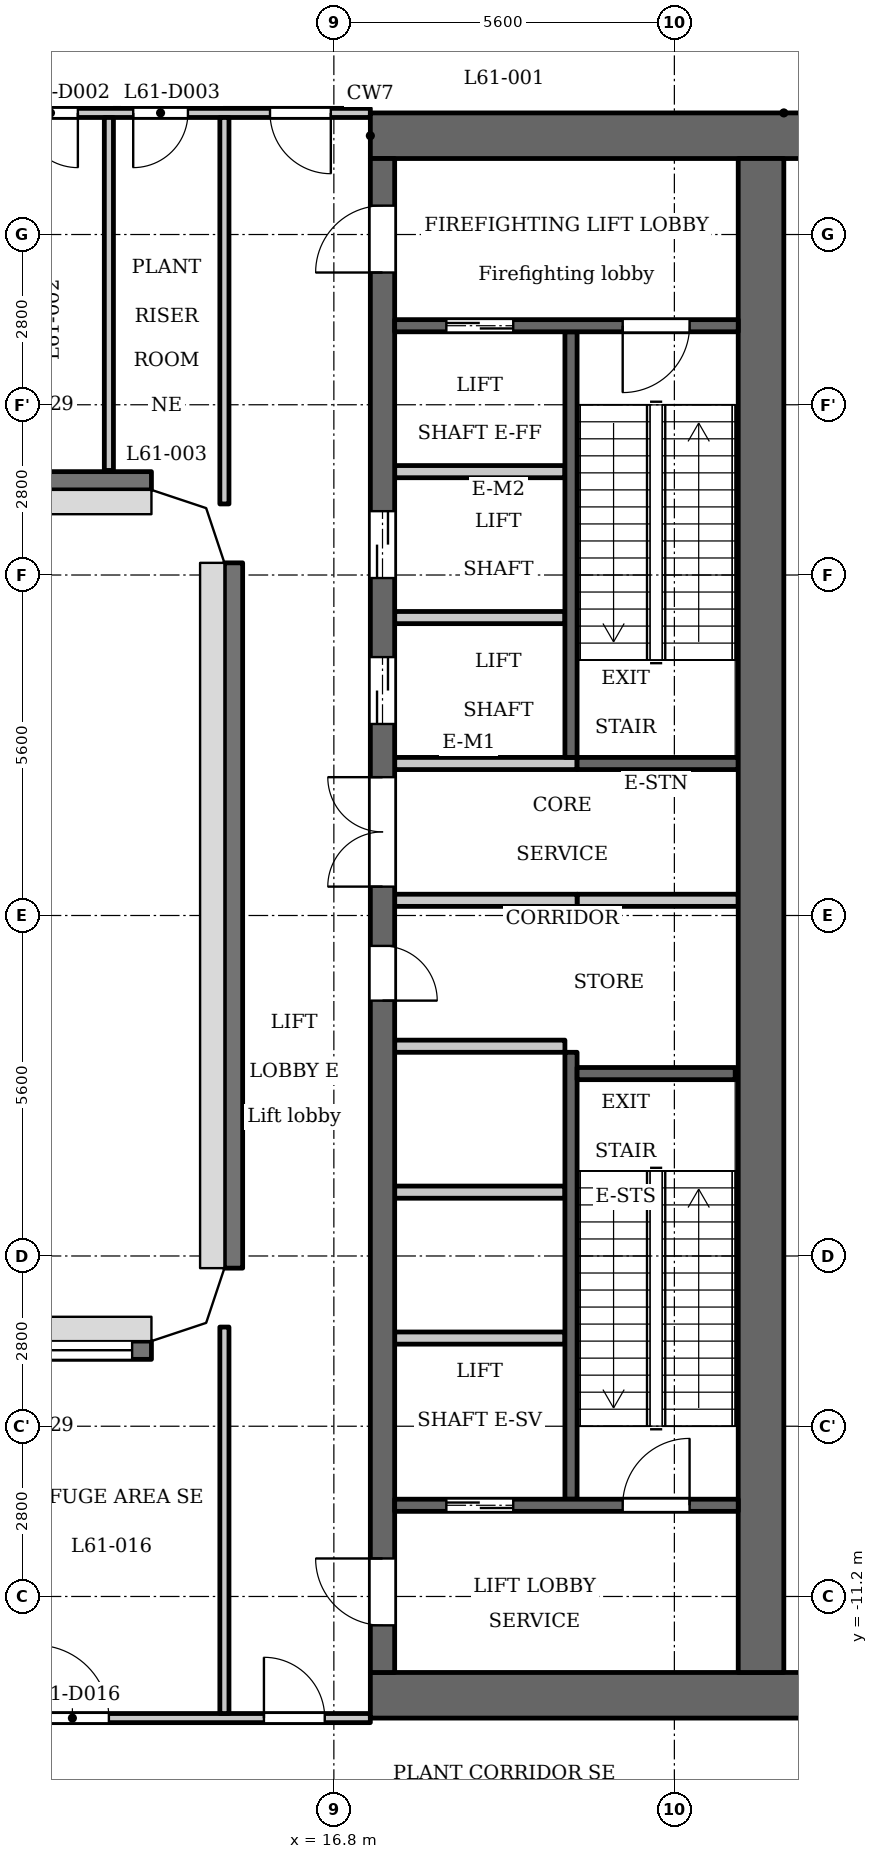
"""IFC4 building model, lengths in metres.
Left out: names, types, materials, properties, quantities, classifications, styles, units other than length and angle.
Written with IfcOpenShell. Run it as: python <this file> out.ifc"""

import sys

from ifc_helpers import new_model, si_unit, direction, frame, frame_2d, origin, place, context, subcontext, project, spatial, polyline, rectangle, outline, extrude, element, fill, save


model = new_model("IFC4")
c1 = context("Model", 3, precision=1e-05, world=origin(), true_north=direction((0.0, 1.0)))
c2 = subcontext(c1, "Body", "Model", "MODEL_VIEW")
j1 = project(units=[si_unit("LENGTHUNIT", "METRE"), si_unit("PLANEANGLEUNIT", "RADIAN")], contexts=[c1])
p1 = place(None, origin())
s1 = spatial("IfcSite", under=j1, at=p1, CompositionType="ELEMENT")
p2 = place(p1, origin())
s2 = spatial("IfcBuilding", under=s1, at=p2, CompositionType="ELEMENT")
p3 = place(p2, frame((0.0, 0.0, 236.3)))
s3 = spatial("IfcBuildingStorey", under=s2, at=p3, CompositionType="ELEMENT", Elevation=236.3)
p4 = place(p3, frame((13.8, -7.15, 0.0), z_axis=(0.0, 0.0, 1.0), x_axis=(-1.0, 0.0, 0.0)))
e1 = element("IfcWall", 1, at=p4, inside=s3, PredefinedType="SOLIDWALL", context=c2, shape_type="SweptSolid", body=[
    extrude(rectangle(XDim=2.6, YDim=0.3, at=frame_2d((1.3, 0.0))), origin(), (0.0, 0.0, 1.0), 4.6),
])
p5 = place(p4, frame((0.317, 0.0, 0.9)))
e2 = element("IfcOpeningElement", 2, at=p5, cuts=e1, PredefinedType="OPENING", context=c2, shape_type="SweptSolid", body=[
    extrude(rectangle(XDim=1.8, YDim=1.5, at=frame_2d((0.9, 0.75))), frame((0.0, 0.16, 0.0), z_axis=(0.0, -1.0, 0.0), x_axis=(1.0, 0.0, 0.0)), (0.0, 0.0, 1.0), 0.32),
])
p6 = place(p3, frame((11.2, 7.15, 0.0), z_axis=(0.0, 0.0, 1.0), x_axis=(1.0, 0.0, 0.0)))
e3 = element("IfcWall", 3, at=p6, inside=s3, PredefinedType="SOLIDWALL", context=c2, shape_type="SweptSolid", body=[
    extrude(rectangle(XDim=2.6, YDim=0.3, at=frame_2d((1.3, 0.0))), origin(), (0.0, 0.0, 1.0), 4.6),
])
p7 = place(p3, frame((15.15, 5.8, 0.0), z_axis=(0.0, 0.0, 1.0), x_axis=(0.0, -1.0, 0.0)))
e4 = element("IfcWall", 4, at=p7, inside=s3, PredefinedType="SOLIDWALL", context=c2, shape_type="SweptSolid", body=[
    extrude(rectangle(XDim=11.6, YDim=0.3, at=frame_2d((5.8, 0.0))), origin(), (0.0, 0.0, 1.0), 4.6),
])
p8 = place(p3, frame((20.7, 2.6, 0.0), z_axis=(0.0, 0.0, 1.0), x_axis=(0.0, 1.0, 0.0)))
e5 = element("IfcWall", 5, at=p8, inside=s3, PredefinedType="SHEAR", context=c2, shape_type="SweptSolid", body=[
    extrude(rectangle(XDim=7.0, YDim=0.2, at=frame_2d((3.5, 0.0))), origin(), (0.0, 0.0, 1.0), 4.6),
])
p9 = place(p3, frame((20.7, -9.6, 0.0), z_axis=(0.0, 0.0, 1.0), x_axis=(0.0, 1.0, 0.0)))
e6 = element("IfcWall", 6, at=p9, inside=s3, PredefinedType="SHEAR", context=c2, shape_type="SweptSolid", body=[
    extrude(rectangle(XDim=7.35, YDim=0.2, at=frame_2d((3.675, 0.0))), origin(), (0.0, 0.0, 1.0), 4.6),
])
p10 = place(p3, frame((20.8, 2.5, 0.0), z_axis=(0.0, 0.0, 1.0), x_axis=(1.0, 0.0, 0.0)))
e7 = element("IfcWall", 7, at=p10, inside=s3, PredefinedType="SHEAR", context=c2, shape_type="SweptSolid", body=[
    extrude(rectangle(XDim=2.65, YDim=0.2, at=frame_2d((1.325, 0.0))), origin(), (0.0, 0.0, 1.0), 4.6),
])
p11 = place(p3, frame((20.8, 0.25, 0.0), z_axis=(0.0, 0.0, 1.0), x_axis=(1.0, 0.0, 0.0)))
e8 = element("IfcWall", 8, at=p11, inside=s3, PredefinedType="PARTITIONING", context=c2, shape_type="SweptSolid", body=[
    extrude(rectangle(XDim=2.65, YDim=0.2, at=frame_2d((1.325, 0.0))), origin(), (0.0, 0.0, 1.0), 4.6),
])
for number, where, z_axis, x_axis in (
    (9, (17.4, 12.825, 0.0), (0.0, 0.0, 1.0), (1.0, 0.0, 0.0)),
    (10, (17.4, -12.825, 0.0), (0.0, 0.0, 1.0), (1.0, 0.0, 0.0)),
):
    element("IfcWall", number, at=place(p3, frame(where, z_axis=z_axis, x_axis=x_axis)), inside=s3, PredefinedType="SHEAR", context=c2, shape_type="SweptSolid", body=[
        extrude(rectangle(XDim=7.6, YDim=0.75, at=frame_2d((3.8, 0.0))), origin(), (0.0, 0.0, 1.0), 4.6),
    ])
p12 = place(p3, frame((17.6, -12.45, 0.0), z_axis=(0.0, 0.0, 1.0), x_axis=(0.0, 1.0, 0.0)))
e11 = element("IfcWall", 11, at=p12, inside=s3, PredefinedType="SHEAR", context=c2, shape_type="SweptSolid", body=[
    extrude(rectangle(XDim=24.9, YDim=0.4, at=frame_2d((12.45, 0.0))), origin(), (0.0, 0.0, 1.0), 4.6),
])
p13 = place(p12, frame((11.05, 0.0, 0.0)))
e12 = element("IfcOpeningElement", 12, at=p13, cuts=e11, PredefinedType="OPENING", context=c2, shape_type="SweptSolid", body=[
    extrude(rectangle(XDim=0.9, YDim=2.1, at=frame_2d((0.45, 1.05))), frame((0.0, 0.21, 0.0), z_axis=(0.0, -1.0, 0.0), x_axis=(1.0, 0.0, 0.0)), (0.0, 0.0, 1.0), 0.42),
])
p14 = place(p12, frame((15.6, 0.0, 0.0)))
e13 = element("IfcOpeningElement", 13, at=p14, cuts=e11, PredefinedType="OPENING", context=c2, shape_type="SweptSolid", body=[
    extrude(rectangle(XDim=1.1, YDim=2.1, at=frame_2d((0.55, 1.05))), frame((0.0, 0.21, 0.0), z_axis=(0.0, -1.0, 0.0), x_axis=(1.0, 0.0, 0.0)), (0.0, 0.0, 1.0), 0.42),
])
p15 = place(p12, frame((18.0, 0.0, 0.0)))
e14 = element("IfcOpeningElement", 14, at=p15, cuts=e11, PredefinedType="OPENING", context=c2, shape_type="SweptSolid", body=[
    extrude(rectangle(XDim=1.1, YDim=2.1, at=frame_2d((0.55, 1.05))), frame((0.0, 0.21, 0.0), z_axis=(0.0, -1.0, 0.0), x_axis=(1.0, 0.0, 0.0)), (0.0, 0.0, 1.0), 0.42),
])
p16 = place(p12, frame((23.025, 0.0, 0.0)))
e15 = element("IfcOpeningElement", 15, at=p16, cuts=e11, PredefinedType="OPENING", context=c2, shape_type="SweptSolid", body=[
    extrude(rectangle(XDim=1.1, YDim=2.1, at=frame_2d((0.55, 1.05))), frame((0.0, 0.21, 0.0), z_axis=(0.0, -1.0, 0.0), x_axis=(1.0, 0.0, 0.0)), (0.0, 0.0, 1.0), 0.42),
])
p17 = place(p12, frame((0.775, 0.0, 0.0)))
e16 = element("IfcOpeningElement", 16, at=p17, cuts=e11, PredefinedType="OPENING", context=c2, shape_type="SweptSolid", body=[
    extrude(rectangle(XDim=1.1, YDim=2.1, at=frame_2d((0.55, 1.05))), frame((0.0, 0.21, 0.0), z_axis=(0.0, -1.0, 0.0), x_axis=(1.0, 0.0, 0.0)), (0.0, 0.0, 1.0), 0.42),
])
p18 = place(p12, frame((12.925, 0.0, 0.0)))
e17 = element("IfcOpeningElement", 17, at=p18, cuts=e11, PredefinedType="OPENING", context=c2, shape_type="SweptSolid", body=[
    extrude(rectangle(XDim=1.8, YDim=2.1, at=frame_2d((0.9, 1.05))), frame((0.0, 0.21, 0.0), z_axis=(0.0, -1.0, 0.0), x_axis=(1.0, 0.0, 0.0)), (0.0, 0.0, 1.0), 0.42),
])
p19 = place(p3, frame((23.825, -12.45, 0.0), z_axis=(0.0, 0.0, 1.0), x_axis=(0.0, 1.0, 0.0)))
e18 = element("IfcWall", 18, at=p19, inside=s3, PredefinedType="SHEAR", context=c2, shape_type="SweptSolid", body=[
    extrude(rectangle(XDim=24.9, YDim=0.75, at=frame_2d((12.45, 0.0))), origin(), (0.0, 0.0, 1.0), 4.6),
])
p20 = place(p3, frame((17.8, -9.7, 0.0), z_axis=(0.0, 0.0, 1.0), x_axis=(1.0, 0.0, 0.0)))
e19 = element("IfcWall", 19, at=p20, inside=s3, PredefinedType="SHEAR", context=c2, shape_type="SweptSolid", body=[
    extrude(rectangle(XDim=5.65, YDim=0.2, at=frame_2d((2.825, 0.0))), origin(), (0.0, 0.0, 1.0), 4.6),
])
p21 = place(p20, frame((0.85, 0.0, 0.0)))
e20 = element("IfcOpeningElement", 20, at=p21, cuts=e19, PredefinedType="OPENING", context=c2, shape_type="SweptSolid", body=[
    extrude(rectangle(XDim=1.1, YDim=2.1, at=frame_2d((0.55, 1.05))), frame((0.0, 0.11, 0.0), z_axis=(0.0, -1.0, 0.0), x_axis=(1.0, 0.0, 0.0)), (0.0, 0.0, 1.0), 0.22),
])
p22 = place(p20, frame((3.75, 0.0, 0.0)))
e21 = element("IfcOpeningElement", 21, at=p22, cuts=e19, PredefinedType="OPENING", context=c2, shape_type="SweptSolid", body=[
    extrude(rectangle(XDim=1.1, YDim=2.1, at=frame_2d((0.55, 1.05))), frame((0.0, 0.11, 0.0), z_axis=(0.0, -1.0, 0.0), x_axis=(1.0, 0.0, 0.0)), (0.0, 0.0, 1.0), 0.22),
])
for number, where, z_axis, x_axis in (
    (22, (17.8, -6.95, 0.0), (0.0, 0.0, 1.0), (1.0, 0.0, 0.0)),
    (23, (17.8, -4.55, 0.0), (0.0, 0.0, 1.0), (1.0, 0.0, 0.0)),
    (24, (17.8, -2.15, 0.0), (0.0, 0.0, 1.0), (1.0, 0.0, 0.0)),
):
    element("IfcWall", number, at=place(p3, frame(where, z_axis=z_axis, x_axis=x_axis)), inside=s3, PredefinedType="PARTITIONING", context=c2, shape_type="SweptSolid", body=[
        extrude(rectangle(XDim=2.8, YDim=0.2, at=frame_2d((1.4, 0.0))), origin(), (0.0, 0.0, 1.0), 4.6),
    ])
for number, where, z_axis, x_axis in (
    (25, (17.8, 0.25, 0.0), (0.0, 0.0, 1.0), (1.0, 0.0, 0.0)),
    (26, (17.8, 2.5, 0.0), (0.0, 0.0, 1.0), (1.0, 0.0, 0.0)),
):
    element("IfcWall", number, at=place(p3, frame(where, z_axis=z_axis, x_axis=x_axis)), inside=s3, PredefinedType="PARTITIONING", context=c2, shape_type="SweptSolid", body=[
        extrude(rectangle(XDim=3.0, YDim=0.2, at=frame_2d((1.5, 0.0))), origin(), (0.0, 0.0, 1.0), 4.6),
    ])
for number, where, z_axis, x_axis in (
    (27, (17.8, 4.9, 0.0), (0.0, 0.0, 1.0), (1.0, 0.0, 0.0)),
    (28, (17.8, 7.3, 0.0), (0.0, 0.0, 1.0), (1.0, 0.0, 0.0)),
):
    element("IfcWall", number, at=place(p3, frame(where, z_axis=z_axis, x_axis=x_axis)), inside=s3, PredefinedType="PARTITIONING", context=c2, shape_type="SweptSolid", body=[
        extrude(rectangle(XDim=2.8, YDim=0.2, at=frame_2d((1.4, 0.0))), origin(), (0.0, 0.0, 1.0), 4.6),
    ])
p23 = place(p3, frame((17.8, 9.7, 0.0), z_axis=(0.0, 0.0, 1.0), x_axis=(1.0, 0.0, 0.0)))
e29 = element("IfcWall", 29, at=p23, inside=s3, PredefinedType="SHEAR", context=c2, shape_type="SweptSolid", body=[
    extrude(rectangle(XDim=5.65, YDim=0.2, at=frame_2d((2.825, 0.0))), origin(), (0.0, 0.0, 1.0), 4.6),
])
p24 = place(p23, frame((0.85, 0.0, 0.0)))
e30 = element("IfcOpeningElement", 30, at=p24, cuts=e29, PredefinedType="OPENING", context=c2, shape_type="SweptSolid", body=[
    extrude(rectangle(XDim=1.1, YDim=2.1, at=frame_2d((0.55, 1.05))), frame((0.0, 0.11, 0.0), z_axis=(0.0, -1.0, 0.0), x_axis=(1.0, 0.0, 0.0)), (0.0, 0.0, 1.0), 0.22),
])
p25 = place(p23, frame((3.75, 0.0, 0.0)))
e31 = element("IfcOpeningElement", 31, at=p25, cuts=e29, PredefinedType="OPENING", context=c2, shape_type="SweptSolid", body=[
    extrude(rectangle(XDim=1.1, YDim=2.1, at=frame_2d((0.55, 1.05))), frame((0.0, 0.11, 0.0), z_axis=(0.0, -1.0, 0.0), x_axis=(1.0, 0.0, 0.0)), (0.0, 0.0, 1.0), 0.22),
])
p26 = place(p3, frame((20.8, -2.6, 0.0), z_axis=(0.0, 0.0, 1.0), x_axis=(1.0, 0.0, 0.0)))
e32 = element("IfcWall", 32, at=p26, inside=s3, PredefinedType="SHEAR", context=c2, shape_type="SweptSolid", body=[
    extrude(rectangle(XDim=2.6, YDim=0.2, at=frame_2d((1.3, 0.0))), origin(), (0.0, 0.0, 1.0), 4.6),
])
p27 = place(p3, frame((11.52, -13.2, 0.0), z_axis=(0.0, 0.0, 1.0), x_axis=(1.0, 0.0, 0.0)))
e33 = element("IfcWall", 33, at=p27, inside=s3, PredefinedType="PARTITIONING", context=c2, shape_type="SweptSolid", body=[
    extrude(rectangle(XDim=5.88, YDim=0.15, at=frame_2d((2.94, 0.0))), origin(), (0.0, 0.0, 1.0), 4.6),
])
p28 = place(p27, frame((4.13, 0.0, 0.0)))
e34 = element("IfcOpeningElement", 34, at=p28, cuts=e33, PredefinedType="OPENING", context=c2, shape_type="SweptSolid", body=[
    extrude(rectangle(XDim=1.0, YDim=2.1, at=frame_2d((0.5, 1.05))), frame((0.0, 0.085, 0.0), z_axis=(0.0, -1.0, 0.0), x_axis=(1.0, 0.0, 0.0)), (0.0, 0.0, 1.0), 0.17),
])
p29 = place(p27, frame((0.38, 0.0, 0.0)))
e35 = element("IfcOpeningElement", 35, at=p29, cuts=e33, PredefinedType="OPENING", context=c2, shape_type="SweptSolid", body=[
    extrude(rectangle(XDim=1.2, YDim=2.1, at=frame_2d((0.6, 1.05))), frame((0.0, 0.085, 0.0), z_axis=(0.0, -1.0, 0.0), x_axis=(1.0, 0.0, 0.0)), (0.0, 0.0, 1.0), 0.17),
])
p30 = place(p3, frame((11.52, 13.2, 0.0), z_axis=(0.0, 0.0, 1.0), x_axis=(1.0, 0.0, 0.0)))
e36 = element("IfcWall", 36, at=p30, inside=s3, PredefinedType="PARTITIONING", context=c2, shape_type="SweptSolid", body=[
    extrude(rectangle(XDim=5.88, YDim=0.15, at=frame_2d((2.94, 0.0))), origin(), (0.0, 0.0, 1.0), 4.6),
])
p31 = place(p30, frame((4.23, 0.0, 0.0)))
e37 = element("IfcOpeningElement", 37, at=p31, cuts=e36, PredefinedType="OPENING", context=c2, shape_type="SweptSolid", body=[
    extrude(rectangle(XDim=1.0, YDim=2.1, at=frame_2d((0.5, 1.05))), frame((0.0, 0.085, 0.0), z_axis=(0.0, -1.0, 0.0), x_axis=(1.0, 0.0, 0.0)), (0.0, 0.0, 1.0), 0.17),
])
p32 = place(p30, frame((0.17, 0.0, 0.0)))
e38 = element("IfcOpeningElement", 38, at=p32, cuts=e36, PredefinedType="OPENING", context=c2, shape_type="SweptSolid", body=[
    extrude(rectangle(XDim=0.9, YDim=2.1, at=frame_2d((0.45, 1.05))), frame((0.0, 0.085, 0.0), z_axis=(0.0, -1.0, 0.0), x_axis=(1.0, 0.0, 0.0)), (0.0, 0.0, 1.0), 0.17),
])
p33 = place(p30, frame((1.98, 0.0, 0.0)))
e39 = element("IfcOpeningElement", 39, at=p33, cuts=e36, PredefinedType="OPENING", context=c2, shape_type="SweptSolid", body=[
    extrude(rectangle(XDim=0.9, YDim=2.1, at=frame_2d((0.45, 1.05))), frame((0.0, 0.085, 0.0), z_axis=(0.0, -1.0, 0.0), x_axis=(1.0, 0.0, 0.0)), (0.0, 0.0, 1.0), 0.17),
])
p34 = place(p3, frame((13.1, 7.32, 0.0), z_axis=(0.0, 0.0, 1.0), x_axis=(0.0, 1.0, 0.0)))
e40 = element("IfcWall", 40, at=p34, inside=s3, PredefinedType="PARTITIONING", context=c2, shape_type="SweptSolid", body=[
    extrude(rectangle(XDim=5.805, YDim=0.15, at=frame_2d((2.902, 0.0))), origin(), (0.0, 0.0, 1.0), 4.6),
])
for number, where, z_axis, x_axis in (
    (41, (15.0, -13.125, 0.0), (0.0, 0.0, 1.0), (0.0, 1.0, 0.0)),
    (42, (15.0, 6.769, 0.0), (0.0, 0.0, 1.0), (0.0, 1.0, 0.0)),
):
    element("IfcWall", number, at=place(p3, frame(where, z_axis=z_axis, x_axis=x_axis)), inside=s3, PredefinedType="PARTITIONING", context=c2, shape_type="SweptSolid", body=[
        extrude(rectangle(XDim=6.356, YDim=0.15, at=frame_2d((3.178, 0.0))), origin(), (0.0, 0.0, 1.0), 4.6),
    ])
p35 = place(p3, origin())
e43 = element("IfcWall", 43, at=p35, inside=s3, PredefinedType="SOLIDWALL", context=c2, shape_type="SweptSolid", body=[
    extrude(outline(polyline([(13.8, 7.0), (14.7, 6.7), (15.0, 5.8), (15.3, 5.8), (15.3, 5.849), (14.937, 6.937), (13.849, 7.3), (13.8, 7.3), (13.8, 7.0)])), origin(), (0.0, 0.0, 1.0), 4.6),
])
e44 = element("IfcWall", 44, at=p35, inside=s3, PredefinedType="SOLIDWALL", context=c2, shape_type="SweptSolid", body=[
    extrude(outline(polyline([(15.0, -5.8), (14.7, -6.7), (13.8, -7.0), (13.8, -7.3), (13.849, -7.3), (14.937, -6.937), (15.3, -5.849), (15.3, -5.8), (15.0, -5.8)])), origin(), (0.0, 0.0, 1.0), 4.6),
])
p36 = place(p21, origin())
e45 = element("IfcDoor", 45, at=p36, inside=s3, OperationType="DOUBLE_DOOR_SLIDING", PredefinedType="DOOR", context=c2, shape_type="SweptSolid", body=[
    extrude(rectangle(XDim=1.1, YDim=2.1, at=frame_2d((0.55, 1.05))), frame((0.0, 0.025, 0.0), z_axis=(0.0, -1.0, 0.0), x_axis=(1.0, 0.0, 0.0)), (0.0, 0.0, 1.0), 0.05),
])
fill(e20, e45)
p37 = place(p13, origin())
e46 = element("IfcDoor", 46, at=p37, inside=s3, OperationType="SINGLE_SWING_LEFT", PredefinedType="DOOR", context=c2, shape_type="SweptSolid", body=[
    extrude(rectangle(XDim=0.9, YDim=2.1, at=frame_2d((0.45, 1.05))), frame((0.0, 0.025, 0.0), z_axis=(0.0, -1.0, 0.0), x_axis=(1.0, 0.0, 0.0)), (0.0, 0.0, 1.0), 0.05),
])
fill(e12, e46)
p38 = place(p14, origin())
e47 = element("IfcDoor", 47, at=p38, inside=s3, OperationType="DOUBLE_DOOR_SLIDING", PredefinedType="DOOR", context=c2, shape_type="SweptSolid", body=[
    extrude(rectangle(XDim=1.1, YDim=2.1, at=frame_2d((0.55, 1.05))), frame((0.0, 0.025, 0.0), z_axis=(0.0, -1.0, 0.0), x_axis=(1.0, 0.0, 0.0)), (0.0, 0.0, 1.0), 0.05),
])
fill(e13, e47)
p39 = place(p15, origin())
e48 = element("IfcDoor", 48, at=p39, inside=s3, OperationType="DOUBLE_DOOR_SLIDING", PredefinedType="DOOR", context=c2, shape_type="SweptSolid", body=[
    extrude(rectangle(XDim=1.1, YDim=2.1, at=frame_2d((0.55, 1.05))), frame((0.0, 0.025, 0.0), z_axis=(0.0, -1.0, 0.0), x_axis=(1.0, 0.0, 0.0)), (0.0, 0.0, 1.0), 0.05),
])
fill(e14, e48)
p40 = place(p24, origin())
e49 = element("IfcDoor", 49, at=p40, inside=s3, OperationType="DOUBLE_DOOR_SLIDING", PredefinedType="DOOR", context=c2, shape_type="SweptSolid", body=[
    extrude(rectangle(XDim=1.1, YDim=2.1, at=frame_2d((0.55, 1.05))), frame((0.0, 0.025, 0.0), z_axis=(0.0, -1.0, 0.0), x_axis=(1.0, 0.0, 0.0)), (0.0, 0.0, 1.0), 0.05),
])
fill(e30, e49)
p41 = place(p16, origin())
e50 = element("IfcDoor", 50, at=p41, inside=s3, OperationType="SINGLE_SWING_RIGHT", PredefinedType="DOOR", context=c2, shape_type="SweptSolid", body=[
    extrude(rectangle(XDim=1.1, YDim=2.1, at=frame_2d((0.55, 1.05))), frame((0.0, 0.025, 0.0), z_axis=(0.0, -1.0, 0.0), x_axis=(1.0, 0.0, 0.0)), (0.0, 0.0, 1.0), 0.05),
])
fill(e15, e50)
p42 = place(p17, origin())
e51 = element("IfcDoor", 51, at=p42, inside=s3, OperationType="SINGLE_SWING_LEFT", PredefinedType="DOOR", context=c2, shape_type="SweptSolid", body=[
    extrude(rectangle(XDim=1.1, YDim=2.1, at=frame_2d((0.55, 1.05))), frame((0.0, 0.025, 0.0), z_axis=(0.0, -1.0, 0.0), x_axis=(1.0, 0.0, 0.0)), (0.0, 0.0, 1.0), 0.05),
])
fill(e16, e51)
p43 = place(p25, origin())
e52 = element("IfcDoor", 52, at=p43, inside=s3, OperationType="SINGLE_SWING_LEFT", PredefinedType="DOOR", context=c2, shape_type="SweptSolid", body=[
    extrude(rectangle(XDim=1.1, YDim=2.1, at=frame_2d((0.55, 1.05))), frame((0.0, 0.025, 0.0), z_axis=(0.0, -1.0, 0.0), x_axis=(1.0, 0.0, 0.0)), (0.0, 0.0, 1.0), 0.05),
])
fill(e31, e52)
p44 = place(p22, origin())
e53 = element("IfcDoor", 53, at=p44, inside=s3, OperationType="SINGLE_SWING_LEFT", PredefinedType="DOOR", context=c2, shape_type="SweptSolid", body=[
    extrude(rectangle(XDim=1.1, YDim=2.1, at=frame_2d((0.55, 1.05))), frame((0.0, 0.025, 0.0), z_axis=(0.0, -1.0, 0.0), x_axis=(1.0, 0.0, 0.0)), (0.0, 0.0, 1.0), 0.05),
])
fill(e21, e53)
p45 = place(p18, origin())
e54 = element("IfcDoor", 54, at=p45, inside=s3, OperationType="DOUBLE_DOOR_SINGLE_SWING", PredefinedType="DOOR", context=c2, shape_type="SweptSolid", body=[
    extrude(rectangle(XDim=1.8, YDim=2.1, at=frame_2d((0.9, 1.05))), frame((0.0, 0.025, 0.0), z_axis=(0.0, -1.0, 0.0), x_axis=(1.0, 0.0, 0.0)), (0.0, 0.0, 1.0), 0.05),
])
fill(e17, e54)
p46 = place(p31, origin())
e55 = element("IfcDoor", 55, at=p46, inside=s3, OperationType="SINGLE_SWING_RIGHT", PredefinedType="DOOR", context=c2, shape_type="SweptSolid", body=[
    extrude(rectangle(XDim=1.0, YDim=2.1, at=frame_2d((0.5, 1.05))), frame((0.0, 0.025, 0.0), z_axis=(0.0, -1.0, 0.0), x_axis=(1.0, 0.0, 0.0)), (0.0, 0.0, 1.0), 0.05),
])
fill(e37, e55)
p47 = place(p32, origin())
e56 = element("IfcDoor", 56, at=p47, inside=s3, OperationType="SINGLE_SWING_RIGHT", PredefinedType="DOOR", context=c2, shape_type="SweptSolid", body=[
    extrude(rectangle(XDim=0.9, YDim=2.1, at=frame_2d((0.45, 1.05))), frame((0.0, 0.025, 0.0), z_axis=(0.0, -1.0, 0.0), x_axis=(1.0, 0.0, 0.0)), (0.0, 0.0, 1.0), 0.05),
])
fill(e38, e56)
p48 = place(p33, origin())
e57 = element("IfcDoor", 57, at=p48, inside=s3, OperationType="SINGLE_SWING_LEFT", PredefinedType="DOOR", context=c2, shape_type="SweptSolid", body=[
    extrude(rectangle(XDim=0.9, YDim=2.1, at=frame_2d((0.45, 1.05))), frame((0.0, 0.025, 0.0), z_axis=(0.0, -1.0, 0.0), x_axis=(1.0, 0.0, 0.0)), (0.0, 0.0, 1.0), 0.05),
])
fill(e39, e57)
p49 = place(p28, origin())
e58 = element("IfcDoor", 58, at=p49, inside=s3, OperationType="SINGLE_SWING_RIGHT", PredefinedType="DOOR", context=c2, shape_type="SweptSolid", body=[
    extrude(rectangle(XDim=1.0, YDim=2.1, at=frame_2d((0.5, 1.05))), frame((0.0, 0.025, 0.0), z_axis=(0.0, -1.0, 0.0), x_axis=(1.0, 0.0, 0.0)), (0.0, 0.0, 1.0), 0.05),
])
fill(e34, e58)
p50 = place(p29, origin())
e59 = element("IfcDoor", 59, at=p50, inside=s3, OperationType="SINGLE_SWING_RIGHT", PredefinedType="DOOR", context=c2, shape_type="SweptSolid", body=[
    extrude(rectangle(XDim=1.2, YDim=2.1, at=frame_2d((0.6, 1.05))), frame((0.0, 0.025, 0.0), z_axis=(0.0, -1.0, 0.0), x_axis=(1.0, 0.0, 0.0)), (0.0, 0.0, 1.0), 0.05),
])
fill(e35, e59)
p51 = place(p5, origin())
e60 = element("IfcWindow", 60, at=p51, inside=s3, PartitioningType="SINGLE_PANEL", PredefinedType="WINDOW", context=c2, shape_type="SweptSolid", body=[
    extrude(rectangle(XDim=1.8, YDim=1.5, at=frame_2d((0.9, 0.75))), frame((0.0, 0.03, 0.0), z_axis=(0.0, -1.0, 0.0), x_axis=(1.0, 0.0, 0.0)), (0.0, 0.0, 1.0), 0.06),
])
fill(e2, e60)
save(model, sys.argv[1])
